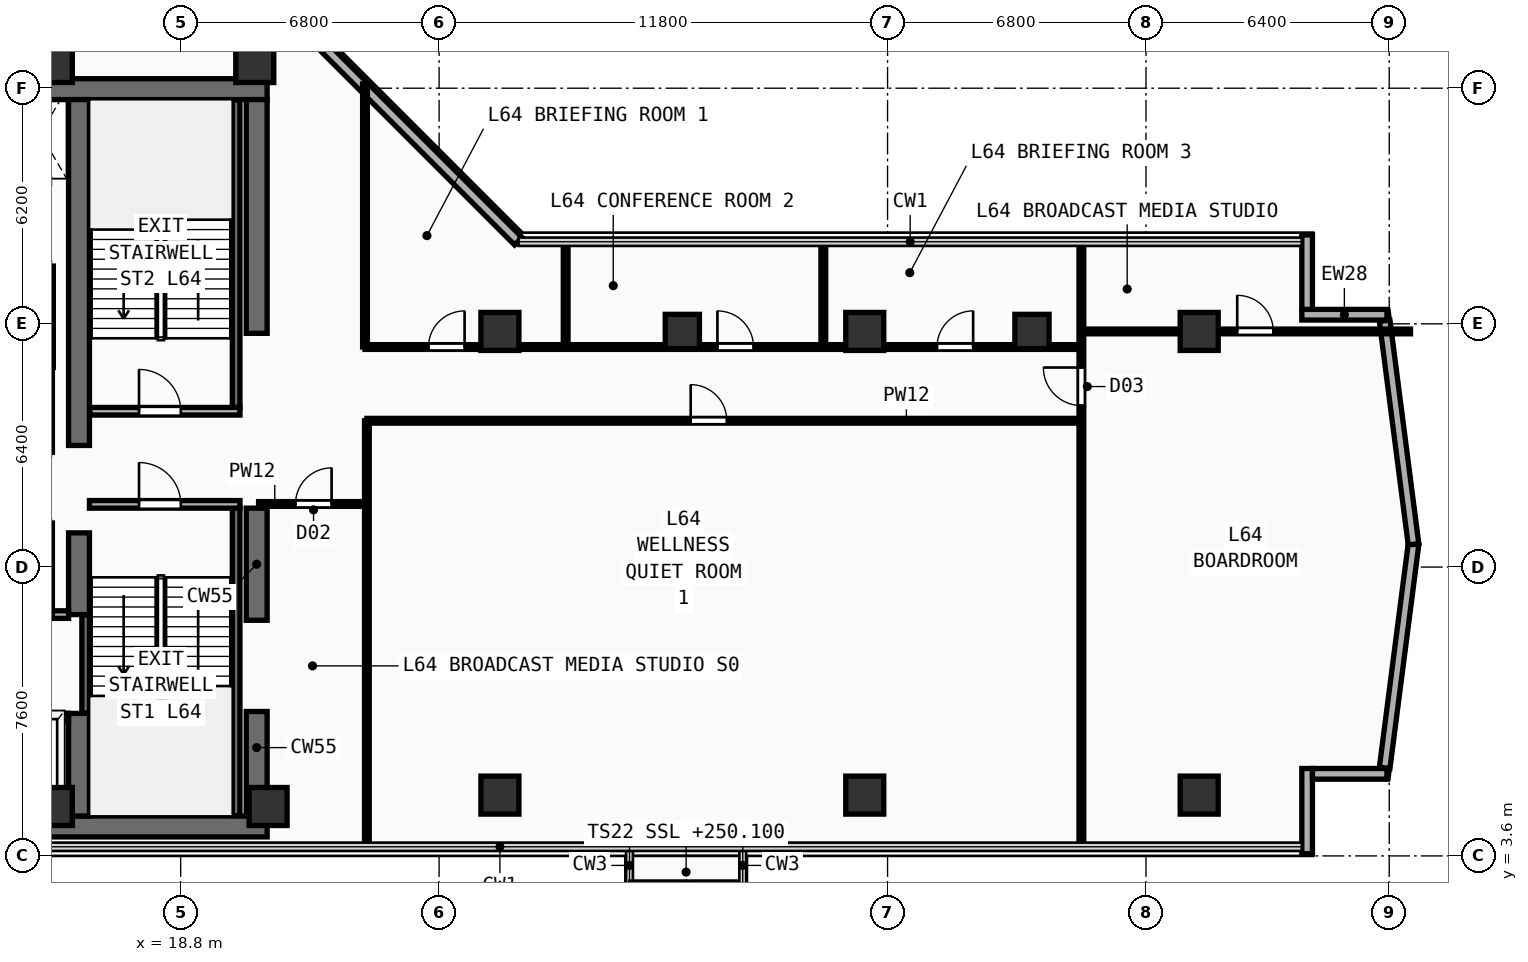
"""IFC4 building model, lengths in metres.
Left out: names, types, materials, properties, quantities, classifications, styles, units other than length and angle.
Written with IfcOpenShell. Run it as: python <this file> out.ifc"""

import sys

from ifc_helpers import new_model, si_unit, direction, frame, frame_2d, origin, origin_2d, place, context, subcontext, project, spatial, rectangle, extrude, element, fill, save


model = new_model("IFC4")
c1 = context("Model", 3, precision=1e-05, world=origin(), true_north=direction((0.0, 1.0)))
c2 = subcontext(c1, "Body", "Model", "MODEL_VIEW")
j1 = project(units=[si_unit("LENGTHUNIT", "METRE"), si_unit("PLANEANGLEUNIT", "RADIAN")], contexts=[c1])
p1 = place(None, origin())
s1 = spatial("IfcSite", under=j1, at=p1, CompositionType="ELEMENT")
p2 = place(p1, origin())
s2 = spatial("IfcBuilding", under=s1, at=p2, CompositionType="ELEMENT")
p3 = place(p2, frame((0.0, 0.0, 250.1)))
s3 = spatial("IfcBuildingStorey", under=s2, at=p3, CompositionType="ELEMENT", Elevation=250.1)
for number, where, z_axis, x_axis in (
    (1, (7.175, 4.375, 0.0), (0.0, 0.0, 1.0), (1.0, 0.0, 0.0)),
    (2, (7.175, 23.775, 0.0), (0.0, 0.0, 1.0), (1.0, 0.0, 0.0)),
):
    element("IfcWall", number, at=place(p3, frame(where, z_axis=z_axis, x_axis=x_axis)), inside=s3, PredefinedType="SHEAR", context=c2, shape_type="SweptSolid", body=[
        extrude(rectangle(XDim=13.9, YDim=0.55, at=frame_2d((6.95, 0.0))), origin(), (0.0, 0.0, 1.0), 3.56),
    ])
p4 = place(p3, frame((20.8, 4.65, 0.0), z_axis=(0.0, 0.0, 1.0), x_axis=(0.0, 1.0, 0.0)))
e3 = element("IfcWall", 3, at=p4, inside=s3, PredefinedType="SHEAR", context=c2, shape_type="SweptSolid", body=[
    extrude(rectangle(XDim=2.75, YDim=0.55, at=frame_2d((1.375, 0.0))), origin(), (0.0, 0.0, 1.0), 3.56),
])
p5 = place(p3, frame((20.8, 9.8, 0.0), z_axis=(0.0, 0.0, 1.0), x_axis=(0.0, 1.0, 0.0)))
e4 = element("IfcWall", 4, at=p5, inside=s3, PredefinedType="SHEAR", context=c2, shape_type="SweptSolid", body=[
    extrude(rectangle(XDim=2.95, YDim=0.55, at=frame_2d((1.475, 0.0))), origin(), (0.0, 0.0, 1.0), 3.56),
])
p6 = place(p3, frame((20.8, 17.35, 0.0), z_axis=(0.0, 0.0, 1.0), x_axis=(0.0, 1.0, 0.0)))
e5 = element("IfcWall", 5, at=p6, inside=s3, PredefinedType="SHEAR", context=c2, shape_type="SweptSolid", body=[
    extrude(rectangle(XDim=6.15, YDim=0.55, at=frame_2d((3.075, 0.0))), origin(), (0.0, 0.0, 1.0), 3.56),
])
p7 = place(p3, frame((16.125, 4.65, 0.0), z_axis=(0.0, 0.0, 1.0), x_axis=(0.0, 1.0, 0.0)))
e6 = element("IfcWall", 6, at=p7, inside=s3, PredefinedType="SHEAR", context=c2, shape_type="SweptSolid", body=[
    extrude(rectangle(XDim=2.7, YDim=0.55, at=frame_2d((1.35, 0.0))), origin(), (0.0, 0.0, 1.0), 3.56),
])
p8 = place(p3, frame((16.125, 9.95, 0.0), z_axis=(0.0, 0.0, 1.0), x_axis=(0.0, 1.0, 0.0)))
e7 = element("IfcWall", 7, at=p8, inside=s3, PredefinedType="SHEAR", context=c2, shape_type="SweptSolid", body=[
    extrude(rectangle(XDim=2.15, YDim=0.55, at=frame_2d((1.075, 0.0))), origin(), (0.0, 0.0, 1.0), 3.56),
])
p9 = place(p3, frame((16.125, 14.4, 0.0), z_axis=(0.0, 0.0, 1.0), x_axis=(0.0, 1.0, 0.0)))
e8 = element("IfcWall", 8, at=p9, inside=s3, PredefinedType="SHEAR", context=c2, shape_type="SweptSolid", body=[
    extrude(rectangle(XDim=9.1, YDim=0.55, at=frame_2d((4.55, 0.0))), origin(), (0.0, 0.0, 1.0), 3.56),
])
for number, where, z_axis, x_axis in (
    (9, (15.45, 4.9, 0.0), (0.0, 0.0, 1.0), (1.0, 0.0, 0.0)),
    (10, (21.1, 4.9, 0.0), (0.0, 0.0, 1.0), (1.0, 0.0, 0.0)),
    (11, (15.45, 24.45, 0.0), (0.0, 0.0, 1.0), (1.0, 0.0, 0.0)),
    (12, (20.75, 24.45, 0.0), (0.0, 0.0, 1.0), (1.0, 0.0, 0.0)),
    (13, (27.2, 5.2, 0.0), (0.0, 0.0, 1.0), (1.0, 0.0, 0.0)),
    (14, (36.8, 5.2, 0.0), (0.0, 0.0, 1.0), (1.0, 0.0, 0.0)),
    (15, (45.6, 5.2, 0.0), (0.0, 0.0, 1.0), (1.0, 0.0, 0.0)),
    (16, (27.2, 17.4, 0.0), (0.0, 0.0, 1.0), (1.0, 0.0, 0.0)),
    (17, (36.8, 17.4, 0.0), (0.0, 0.0, 1.0), (1.0, 0.0, 0.0)),
    (18, (45.6, 17.4, 0.0), (0.0, 0.0, 1.0), (1.0, 0.0, 0.0)),
):
    element("IfcColumn", number, at=place(p3, frame(where, z_axis=z_axis, x_axis=x_axis)), inside=s3, PredefinedType="COLUMN", context=c2, shape_type="SweptSolid", body=[
        extrude(rectangle(XDim=1.0, YDim=1.0, at=origin_2d()), origin(), (0.0, 0.0, 1.0), 3.56),
    ])
for number, where, z_axis, x_axis in (
    (19, (32.0, 17.4, 0.0), (0.0, 0.0, 1.0), (1.0, 0.0, 0.0)),
    (20, (41.2, 17.4, 0.0), (0.0, 0.0, 1.0), (1.0, 0.0, 0.0)),
):
    element("IfcColumn", number, at=place(p3, frame(where, z_axis=z_axis, x_axis=x_axis)), inside=s3, PredefinedType="COLUMN", context=c2, shape_type="SweptSolid", body=[
        extrude(rectangle(XDim=0.9, YDim=0.9, at=origin_2d()), origin(), (0.0, 0.0, 1.0), 3.56),
    ])
p10 = place(p3, frame((48.44, 3.66, 0.0), z_axis=(0.0, 0.0, 1.0), x_axis=(0.0, 1.0, 0.0)))
e21 = element("IfcWall", 21, at=p10, inside=s3, PredefinedType="SOLIDWALL", context=c2, shape_type="SweptSolid", body=[
    extrude(rectangle(XDim=2.24, YDim=0.28, at=frame_2d((1.12, 0.0))), origin(), (0.0, 0.0, 1.0), 3.56),
])
p11 = place(p3, frame((48.58, 5.76, 0.0), z_axis=(0.0, 0.0, 1.0), x_axis=(1.0, 0.0, 0.0)))
e22 = element("IfcWall", 22, at=p11, inside=s3, PredefinedType="SOLIDWALL", context=c2, shape_type="SweptSolid", body=[
    extrude(rectangle(XDim=1.96, YDim=0.28, at=frame_2d((0.98, 0.0))), origin(), (0.0, 0.0, 1.0), 3.56),
])
p12 = place(p3, frame((48.44, 17.965, 0.0), z_axis=(0.0, 0.0, 1.0), x_axis=(0.0, 1.0, 0.0)))
e23 = element("IfcWall", 23, at=p12, inside=s3, PredefinedType="SOLIDWALL", context=c2, shape_type="SweptSolid", body=[
    extrude(rectangle(XDim=1.975, YDim=0.28, at=frame_2d((0.987, 0.0))), origin(), (0.0, 0.0, 1.0), 3.56),
])
p13 = place(p3, frame((48.3, 17.84, 0.0), z_axis=(0.0, 0.0, 1.0), x_axis=(1.0, 0.0, 0.0)))
e24 = element("IfcWall", 24, at=p13, inside=s3, PredefinedType="SOLIDWALL", context=c2, shape_type="SweptSolid", body=[
    extrude(rectangle(XDim=2.24, YDim=0.28, at=frame_2d((1.12, 0.0))), origin(), (0.0, 0.0, 1.0), 3.56),
])
p14 = place(p3, frame((27.685, 19.775, 0.0), z_axis=(0.0, 0.0, 1.0), x_axis=(-0.707106781187, 0.707106781187, 0.0)))
e25 = element("IfcWall", 25, at=p14, inside=s3, PredefinedType="SOLIDWALL", context=c2, shape_type="SweptSolid", body=[
    extrude(rectangle(XDim=9.207, YDim=0.28, at=frame_2d((4.603, 0.0))), origin(), (0.0, 0.0, 1.0), 3.56),
])
for number, where, z_axis, x_axis in (
    (26, (50.48, 5.918, 0.0), (0.0, 0.0, 1.0), (0.128, 0.992, 0.0)),
    (27, (51.239, 11.799, 0.0), (0.0, 0.0, 1.0), (-0.128, 0.992, 0.0)),
):
    element("IfcWall", number, at=place(p3, frame(where, z_axis=z_axis, x_axis=x_axis)), inside=s3, PredefinedType="SOLIDWALL", context=c2, shape_type="SweptSolid", body=[
        extrude(rectangle(XDim=5.931, YDim=0.28, at=frame_2d((2.966, 0.0))), origin(), (0.0, 0.0, 1.0), 3.56),
    ])
p15 = place(p3, frame((16.3, 7.36, 0.0), z_axis=(0.0, 0.0, 1.0), x_axis=(0.0, 1.0, 0.0)))
e28 = element("IfcWall", 28, at=p15, inside=s3, PredefinedType="SHEAR", context=c2, shape_type="SweptSolid", body=[
    extrude(rectangle(XDim=2.58, YDim=0.2, at=frame_2d((1.29, 0.0))), origin(), (0.0, 0.0, 1.0), 3.56),
])
p16 = place(p3, frame((20.26, 4.66, 0.0), z_axis=(0.0, 0.0, 1.0), x_axis=(0.0, 1.0, 0.0)))
e29 = element("IfcWall", 29, at=p16, inside=s3, PredefinedType="SHEAR", context=c2, shape_type="SweptSolid", body=[
    extrude(rectangle(XDim=8.09, YDim=0.2, at=frame_2d((4.045, 0.0))), origin(), (0.0, 0.0, 1.0), 3.56),
])
p17 = place(p3, frame((16.4, 12.85, 0.0), z_axis=(0.0, 0.0, 1.0), x_axis=(1.0, 0.0, 0.0)))
e30 = element("IfcWall", 30, at=p17, inside=s3, PredefinedType="PARTITIONING", context=c2, shape_type="SweptSolid", body=[
    extrude(rectangle(XDim=3.96, YDim=0.2, at=frame_2d((1.98, 0.0))), origin(), (0.0, 0.0, 1.0), 3.56),
])
p18 = place(p17, frame((1.304, 0.0, 0.0)))
e31 = element("IfcOpeningElement", 31, at=p18, cuts=e30, PredefinedType="OPENING", context=c2, shape_type="SweptSolid", body=[
    extrude(rectangle(XDim=1.1, YDim=2.2, at=frame_2d((0.55, 1.1))), frame((0.0, 0.11, 0.0), z_axis=(0.0, -1.0, 0.0), x_axis=(1.0, 0.0, 0.0)), (0.0, 0.0, 1.0), 0.22),
])
p19 = place(p3, frame((20.26, 15.4, 0.0), z_axis=(0.0, 0.0, 1.0), x_axis=(0.0, 1.0, 0.0)))
e32 = element("IfcWall", 32, at=p19, inside=s3, PredefinedType="SHEAR", context=c2, shape_type="SweptSolid", body=[
    extrude(rectangle(XDim=8.09, YDim=0.2, at=frame_2d((4.045, 0.0))), origin(), (0.0, 0.0, 1.0), 3.56),
])
p20 = place(p3, frame((16.41, 15.3, 0.0), z_axis=(0.0, 0.0, 1.0), x_axis=(1.0, 0.0, 0.0)))
e33 = element("IfcWall", 33, at=p20, inside=s3, PredefinedType="PARTITIONING", context=c2, shape_type="SweptSolid", body=[
    extrude(rectangle(XDim=3.95, YDim=0.2, at=frame_2d((1.975, 0.0))), origin(), (0.0, 0.0, 1.0), 3.56),
])
p21 = place(p20, frame((1.294, 0.0, 0.0)))
e34 = element("IfcOpeningElement", 34, at=p21, cuts=e33, PredefinedType="OPENING", context=c2, shape_type="SweptSolid", body=[
    extrude(rectangle(XDim=1.1, YDim=2.2, at=frame_2d((0.55, 1.1))), frame((0.0, 0.11, 0.0), z_axis=(0.0, -1.0, 0.0), x_axis=(1.0, 0.0, 0.0)), (0.0, 0.0, 1.0), 0.22),
])
p22 = place(p3, frame((7.5, 7.25, 0.0), z_axis=(0.0, 0.0, 1.0), x_axis=(1.0, 0.0, 0.0)))
e35 = element("IfcWall", 35, at=p22, inside=s3, PredefinedType="PARTITIONING", context=c2, shape_type="SweptSolid", body=[
    extrude(rectangle(XDim=8.35, YDim=0.2, at=frame_2d((4.175, 0.0))), origin(), (0.0, 0.0, 1.0), 3.56),
])
p23 = place(p22, frame((0.53, 0.0, 0.0)))
e36 = element("IfcOpeningElement", 36, at=p23, cuts=e35, PredefinedType="OPENING", context=c2, shape_type="SweptSolid", body=[
    extrude(rectangle(XDim=1.1, YDim=2.2, at=frame_2d((0.55, 1.1))), frame((0.0, 0.11, 0.0), z_axis=(0.0, -1.0, 0.0), x_axis=(1.0, 0.0, 0.0)), (0.0, 0.0, 1.0), 0.22),
])
p24 = place(p22, frame((2.37, 0.0, 0.0)))
e37 = element("IfcOpeningElement", 37, at=p24, cuts=e35, PredefinedType="OPENING", context=c2, shape_type="SweptSolid", body=[
    extrude(rectangle(XDim=1.1, YDim=2.2, at=frame_2d((0.55, 1.1))), frame((0.0, 0.11, 0.0), z_axis=(0.0, -1.0, 0.0), x_axis=(1.0, 0.0, 0.0)), (0.0, 0.0, 1.0), 0.22),
])
p25 = place(p22, frame((4.33, 0.0, 0.0)))
e38 = element("IfcOpeningElement", 38, at=p25, cuts=e35, PredefinedType="OPENING", context=c2, shape_type="SweptSolid", body=[
    extrude(rectangle(XDim=1.1, YDim=2.2, at=frame_2d((0.55, 1.1))), frame((0.0, 0.11, 0.0), z_axis=(0.0, -1.0, 0.0), x_axis=(1.0, 0.0, 0.0)), (0.0, 0.0, 1.0), 0.22),
])
p26 = place(p22, frame((6.5, 0.0, 0.0)))
e39 = element("IfcOpeningElement", 39, at=p26, cuts=e35, PredefinedType="OPENING", context=c2, shape_type="SweptSolid", body=[
    extrude(rectangle(XDim=1.1, YDim=2.2, at=frame_2d((0.55, 1.1))), frame((0.0, 0.11, 0.0), z_axis=(0.0, -1.0, 0.0), x_axis=(1.0, 0.0, 0.0)), (0.0, 0.0, 1.0), 0.22),
])
p27 = place(p3, frame((7.5, 9.95, 0.0), z_axis=(0.0, 0.0, 1.0), x_axis=(1.0, 0.0, 0.0)))
e40 = element("IfcWall", 40, at=p27, inside=s3, PredefinedType="PARTITIONING", context=c2, shape_type="SweptSolid", body=[
    extrude(rectangle(XDim=8.35, YDim=0.2, at=frame_2d((4.175, 0.0))), origin(), (0.0, 0.0, 1.0), 3.56),
])
p28 = place(p3, frame((15.35, 9.95, 0.0), z_axis=(0.0, 0.0, 1.0), x_axis=(0.0, 1.0, 0.0)))
e41 = element("IfcWall", 41, at=p28, inside=s3, PredefinedType="PARTITIONING", context=c2, shape_type="SweptSolid", body=[
    extrude(rectangle(XDim=2.41, YDim=0.15, at=frame_2d((1.205, 0.0))), origin(), (0.0, 0.0, 1.0), 3.56),
])
p29 = place(p3, frame((15.35, 14.22, 0.0), z_axis=(0.0, 0.0, 1.0), x_axis=(0.0, 1.0, 0.0)))
e42 = element("IfcWall", 42, at=p29, inside=s3, PredefinedType="PARTITIONING", context=c2, shape_type="SweptSolid", body=[
    extrude(rectangle(XDim=2.23, YDim=0.15, at=frame_2d((1.115, 0.0))), origin(), (0.0, 0.0, 1.0), 3.56),
])
p30 = place(p3, frame((15.35, 16.45, 0.0), z_axis=(0.0, 0.0, 1.0), x_axis=(0.0, 1.0, 0.0)))
e43 = element("IfcWall", 43, at=p30, inside=s3, PredefinedType="PARTITIONING", context=c2, shape_type="SweptSolid", body=[
    extrude(rectangle(XDim=2.67, YDim=0.2, at=frame_2d((1.335, 0.0))), origin(), (0.0, 0.0, 1.0), 3.56),
])
p31 = place(p3, frame((20.85, 12.86, 0.0), z_axis=(0.0, 0.0, 1.0), x_axis=(1.0, 0.0, 0.0)))
e44 = element("IfcWall", 44, at=p31, inside=s3, PredefinedType="PARTITIONING", context=c2, shape_type="SweptSolid", body=[
    extrude(rectangle(XDim=2.85, YDim=0.125, at=frame_2d((1.425, 0.0))), origin(), (0.0, 0.0, 1.0), 3.56),
])
p32 = place(p31, frame((0.971, 0.0, 0.0)))
e45 = element("IfcOpeningElement", 45, at=p32, cuts=e44, PredefinedType="OPENING", context=c2, shape_type="SweptSolid", body=[
    extrude(rectangle(XDim=0.95, YDim=2.15, at=frame_2d((0.475, 1.075))), frame((0.0, 0.073, 0.0), z_axis=(0.0, -1.0, 0.0), x_axis=(1.0, 0.0, 0.0)), (0.0, 0.0, 1.0), 0.145),
])
p33 = place(p3, frame((23.7, 3.84, 0.0), z_axis=(0.0, 0.0, 1.0), x_axis=(0.0, 1.0, 0.0)))
e46 = element("IfcWall", 46, at=p33, inside=s3, PredefinedType="PARTITIONING", context=c2, shape_type="SweptSolid", body=[
    extrude(rectangle(XDim=11.21, YDim=0.125, at=frame_2d((5.605, 0.0))), origin(), (0.0, 0.0, 1.0), 3.56),
])
p34 = place(p3, frame((23.7, 15.05, 0.0), z_axis=(0.0, 0.0, 1.0), x_axis=(1.0, 0.0, 0.0)))
e47 = element("IfcWall", 47, at=p34, inside=s3, PredefinedType="PARTITIONING", context=c2, shape_type="SweptSolid", body=[
    extrude(rectangle(XDim=18.8, YDim=0.125, at=frame_2d((9.4, 0.0))), origin(), (0.0, 0.0, 1.0), 3.56),
])
p35 = place(p34, frame((8.52, 0.0, 0.0)))
e48 = element("IfcOpeningElement", 48, at=p35, cuts=e47, PredefinedType="OPENING", context=c2, shape_type="SweptSolid", body=[
    extrude(rectangle(XDim=0.95, YDim=2.15, at=frame_2d((0.475, 1.075))), frame((0.0, 0.073, 0.0), z_axis=(0.0, -1.0, 0.0), x_axis=(1.0, 0.0, 0.0)), (0.0, 0.0, 1.0), 0.145),
])
p36 = place(p3, frame((42.5, 3.84, 0.0), z_axis=(0.0, 0.0, 1.0), x_axis=(0.0, 1.0, 0.0)))
e49 = element("IfcWall", 49, at=p36, inside=s3, PredefinedType="PARTITIONING", context=c2, shape_type="SweptSolid", body=[
    extrude(rectangle(XDim=15.92, YDim=0.125, at=frame_2d((7.96, 0.0))), origin(), (0.0, 0.0, 1.0), 3.56),
])
p37 = place(p36, frame((11.61, 0.0, 0.0)))
e50 = element("IfcOpeningElement", 50, at=p37, cuts=e49, PredefinedType="OPENING", context=c2, shape_type="SweptSolid", body=[
    extrude(rectangle(XDim=1.0, YDim=2.2, at=frame_2d((0.5, 1.1))), frame((0.0, 0.073, 0.0), z_axis=(0.0, -1.0, 0.0), x_axis=(1.0, 0.0, 0.0)), (0.0, 0.0, 1.0), 0.145),
])
p38 = place(p3, frame((42.5, 17.4, 0.0), z_axis=(0.0, 0.0, 1.0), x_axis=(1.0, 0.0, 0.0)))
e51 = element("IfcWall", 51, at=p38, inside=s3, PredefinedType="PARTITIONING", context=c2, shape_type="SweptSolid", body=[
    extrude(rectangle(XDim=8.66, YDim=0.125, at=frame_2d((4.33, 0.0))), origin(), (0.0, 0.0, 1.0), 3.2),
])
p39 = place(p38, frame((4.1, 0.0, 0.0)))
e52 = element("IfcOpeningElement", 52, at=p39, cuts=e51, PredefinedType="OPENING", context=c2, shape_type="SweptSolid", body=[
    extrude(rectangle(XDim=0.95, YDim=2.15, at=frame_2d((0.475, 1.075))), frame((0.0, 0.073, 0.0), z_axis=(0.0, -1.0, 0.0), x_axis=(1.0, 0.0, 0.0)), (0.0, 0.0, 1.0), 0.145),
])
p40 = place(p3, frame((23.65, 16.99, 0.0), z_axis=(0.0, 0.0, 1.0), x_axis=(0.0, 1.0, 0.0)))
e53 = element("IfcWall", 53, at=p40, inside=s3, PredefinedType="PARTITIONING", context=c2, shape_type="SweptSolid", body=[
    extrude(rectangle(XDim=6.92, YDim=0.125, at=frame_2d((3.46, 0.0))), origin(), (0.0, 0.0, 1.0), 3.56),
])
p41 = place(p3, frame((23.65, 16.99, 0.0), z_axis=(0.0, 0.0, 1.0), x_axis=(1.0, 0.0, 0.0)))
e54 = element("IfcWall", 54, at=p41, inside=s3, PredefinedType="PARTITIONING", context=c2, shape_type="SweptSolid", body=[
    extrude(rectangle(XDim=18.85, YDim=0.125, at=frame_2d((9.425, 0.0))), origin(), (0.0, 0.0, 1.0), 3.56),
])
p42 = place(p41, frame((1.671, 0.0, 0.0)))
e55 = element("IfcOpeningElement", 55, at=p42, cuts=e54, PredefinedType="OPENING", context=c2, shape_type="SweptSolid", body=[
    extrude(rectangle(XDim=0.95, YDim=2.15, at=frame_2d((0.475, 1.075))), frame((0.0, 0.073, 0.0), z_axis=(0.0, -1.0, 0.0), x_axis=(1.0, 0.0, 0.0)), (0.0, 0.0, 1.0), 0.145),
])
p43 = place(p41, frame((9.273, 0.0, 0.0)))
e56 = element("IfcOpeningElement", 56, at=p43, cuts=e54, PredefinedType="OPENING", context=c2, shape_type="SweptSolid", body=[
    extrude(rectangle(XDim=0.95, YDim=2.15, at=frame_2d((0.475, 1.075))), frame((0.0, 0.073, 0.0), z_axis=(0.0, -1.0, 0.0), x_axis=(1.0, 0.0, 0.0)), (0.0, 0.0, 1.0), 0.145),
])
p44 = place(p41, frame((15.052, 0.0, 0.0)))
e57 = element("IfcOpeningElement", 57, at=p44, cuts=e54, PredefinedType="OPENING", context=c2, shape_type="SweptSolid", body=[
    extrude(rectangle(XDim=0.95, YDim=2.15, at=frame_2d((0.475, 1.075))), frame((0.0, 0.073, 0.0), z_axis=(0.0, -1.0, 0.0), x_axis=(1.0, 0.0, 0.0)), (0.0, 0.0, 1.0), 0.145),
])
for number, where, z_axis, x_axis in (
    (58, (28.93, 16.99, 0.0), (0.0, 0.0, 1.0), (0.0, 1.0, 0.0)),
    (59, (35.71, 16.99, 0.0), (0.0, 0.0, 1.0), (0.0, 1.0, 0.0)),
):
    element("IfcWall", number, at=place(p3, frame(where, z_axis=z_axis, x_axis=x_axis)), inside=s3, PredefinedType="PARTITIONING", context=c2, shape_type="SweptSolid", body=[
        extrude(rectangle(XDim=2.77, YDim=0.125, at=frame_2d((1.385, 0.0))), origin(), (0.0, 0.0, 1.0), 3.56),
    ])
p45 = place(p18, frame((1.1, 0.0, 0.0), z_axis=(0.0, 0.0, 1.0), x_axis=(-1.0, 0.0, 0.0)))
e60 = element("IfcDoor", 60, at=p45, inside=s3, OperationType="SINGLE_SWING_RIGHT", PredefinedType="DOOR", context=c2, shape_type="SweptSolid", body=[
    extrude(rectangle(XDim=1.1, YDim=2.2, at=frame_2d((0.55, 1.1))), frame((0.0, 0.025, 0.0), z_axis=(0.0, -1.0, 0.0), x_axis=(1.0, 0.0, 0.0)), (0.0, 0.0, 1.0), 0.05),
])
fill(e31, e60)
p46 = place(p21, origin())
e61 = element("IfcDoor", 61, at=p46, inside=s3, OperationType="SINGLE_SWING_LEFT", PredefinedType="DOOR", context=c2, shape_type="SweptSolid", body=[
    extrude(rectangle(XDim=1.1, YDim=2.2, at=frame_2d((0.55, 1.1))), frame((0.0, 0.025, 0.0), z_axis=(0.0, -1.0, 0.0), x_axis=(1.0, 0.0, 0.0)), (0.0, 0.0, 1.0), 0.05),
])
fill(e34, e61)
p47 = place(p32, origin())
e62 = element("IfcDoor", 62, at=p47, inside=s3, OperationType="SINGLE_SWING_RIGHT", PredefinedType="DOOR", context=c2, shape_type="SweptSolid", body=[
    extrude(rectangle(XDim=0.95, YDim=2.15, at=frame_2d((0.475, 1.075))), frame((0.0, 0.025, 0.0), z_axis=(0.0, -1.0, 0.0), x_axis=(1.0, 0.0, 0.0)), (0.0, 0.0, 1.0), 0.05),
])
fill(e45, e62)
p48 = place(p35, origin())
e63 = element("IfcDoor", 63, at=p48, inside=s3, OperationType="SINGLE_SWING_LEFT", PredefinedType="DOOR", context=c2, shape_type="SweptSolid", body=[
    extrude(rectangle(XDim=0.95, YDim=2.15, at=frame_2d((0.475, 1.075))), frame((0.0, 0.025, 0.0), z_axis=(0.0, -1.0, 0.0), x_axis=(1.0, 0.0, 0.0)), (0.0, 0.0, 1.0), 0.05),
])
fill(e48, e63)
p49 = place(p37, origin())
e64 = element("IfcDoor", 64, at=p49, inside=s3, OperationType="SINGLE_SWING_RIGHT", PredefinedType="DOOR", context=c2, shape_type="SweptSolid", body=[
    extrude(rectangle(XDim=1.0, YDim=2.2, at=frame_2d((0.5, 1.1))), frame((0.0, 0.025, 0.0), z_axis=(0.0, -1.0, 0.0), x_axis=(1.0, 0.0, 0.0)), (0.0, 0.0, 1.0), 0.05),
])
fill(e50, e64)
p50 = place(p39, origin())
e65 = element("IfcDoor", 65, at=p50, inside=s3, OperationType="SINGLE_SWING_LEFT", PredefinedType="DOOR", context=c2, shape_type="SweptSolid", body=[
    extrude(rectangle(XDim=0.95, YDim=2.15, at=frame_2d((0.475, 1.075))), frame((0.0, 0.025, 0.0), z_axis=(0.0, -1.0, 0.0), x_axis=(1.0, 0.0, 0.0)), (0.0, 0.0, 1.0), 0.05),
])
fill(e52, e65)
p51 = place(p42, origin())
e66 = element("IfcDoor", 66, at=p51, inside=s3, OperationType="SINGLE_SWING_RIGHT", PredefinedType="DOOR", context=c2, shape_type="SweptSolid", body=[
    extrude(rectangle(XDim=0.95, YDim=2.15, at=frame_2d((0.475, 1.075))), frame((0.0, 0.025, 0.0), z_axis=(0.0, -1.0, 0.0), x_axis=(1.0, 0.0, 0.0)), (0.0, 0.0, 1.0), 0.05),
])
fill(e55, e66)
p52 = place(p43, origin())
e67 = element("IfcDoor", 67, at=p52, inside=s3, OperationType="SINGLE_SWING_LEFT", PredefinedType="DOOR", context=c2, shape_type="SweptSolid", body=[
    extrude(rectangle(XDim=0.95, YDim=2.15, at=frame_2d((0.475, 1.075))), frame((0.0, 0.025, 0.0), z_axis=(0.0, -1.0, 0.0), x_axis=(1.0, 0.0, 0.0)), (0.0, 0.0, 1.0), 0.05),
])
fill(e56, e67)
p53 = place(p44, origin())
e68 = element("IfcDoor", 68, at=p53, inside=s3, OperationType="SINGLE_SWING_RIGHT", PredefinedType="DOOR", context=c2, shape_type="SweptSolid", body=[
    extrude(rectangle(XDim=0.95, YDim=2.15, at=frame_2d((0.475, 1.075))), frame((0.0, 0.025, 0.0), z_axis=(0.0, -1.0, 0.0), x_axis=(1.0, 0.0, 0.0)), (0.0, 0.0, 1.0), 0.05),
])
fill(e57, e68)
save(model, sys.argv[1])
